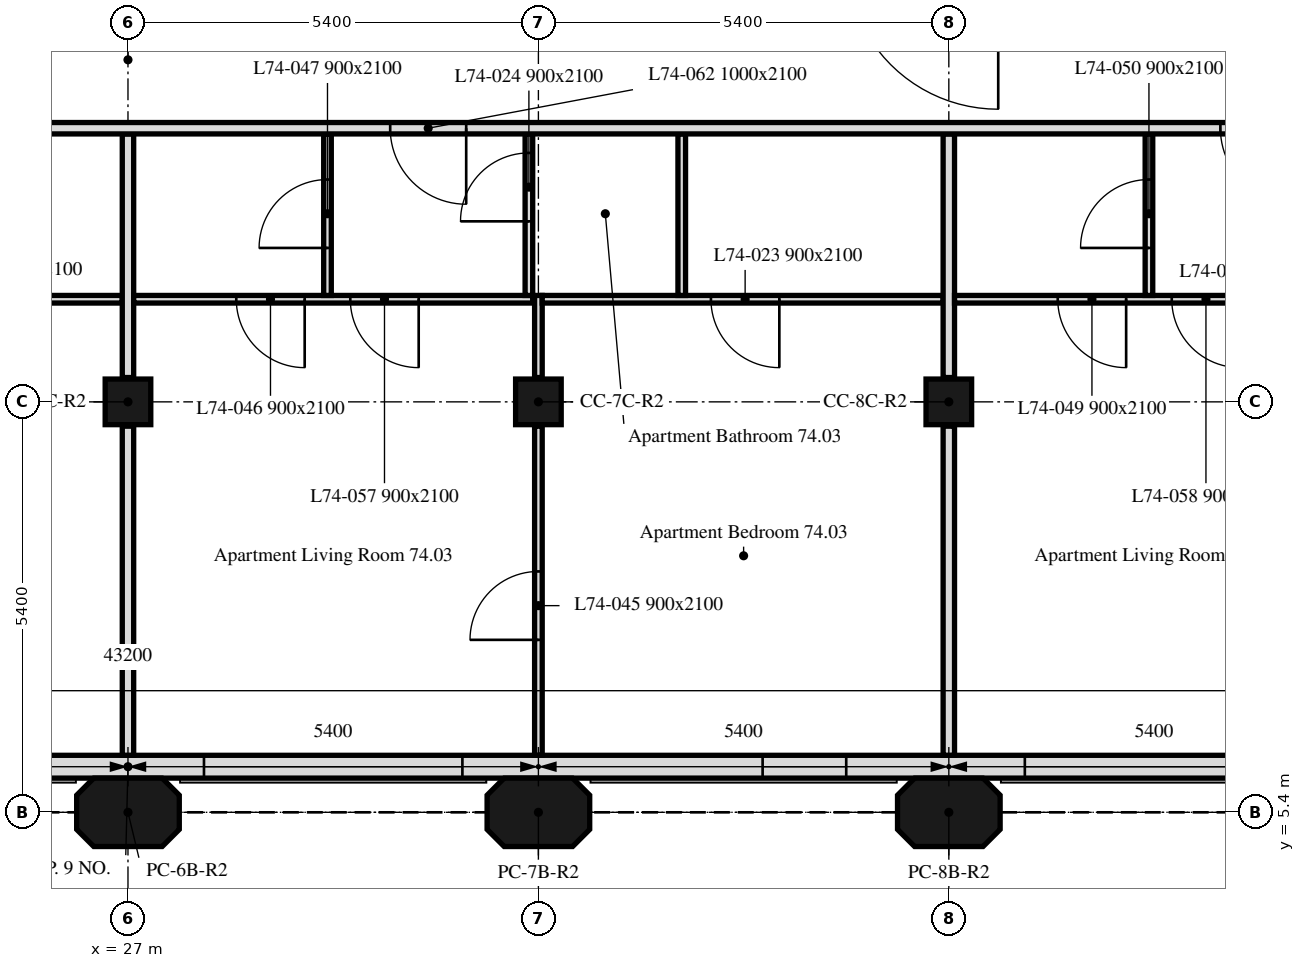
"""IFC4 building model, lengths in metres.
Left out: names, types, materials, properties, quantities, classifications, styles, units other than length and angle.
Written with IfcOpenShell. Run it as: python <this file> out.ifc"""

import sys

from ifc_helpers import new_model, si_unit, direction, frame, frame_2d, origin, origin_2d, place, context, subcontext, project, spatial, polyline, rectangle, outline, extrude, element, fill, save


model = new_model("IFC4")
c1 = context("Model", 3, precision=1e-05, world=origin(), true_north=direction((0.0, 1.0)))
c2 = subcontext(c1, "Body", "Model", "MODEL_VIEW")
j1 = project(units=[si_unit("LENGTHUNIT", "METRE"), si_unit("PLANEANGLEUNIT", "RADIAN")], contexts=[c1])
p1 = place(None, origin())
s1 = spatial("IfcSite", under=j1, at=p1, CompositionType="ELEMENT")
p2 = place(p1, origin())
s2 = spatial("IfcBuilding", under=s1, at=p2, CompositionType="ELEMENT")
p3 = place(p2, frame((0.0, 0.0, 298.3)))
s3 = spatial("IfcBuildingStorey", under=s2, at=p3, CompositionType="ELEMENT", Elevation=298.3)
for number, where, z_axis, x_axis in (
    (1, (27.0, 5.4, 0.0), (0.0, 0.0, 1.0), (1.0, 0.0, 0.0)),
    (2, (32.4, 5.4, 0.0), (0.0, 0.0, 1.0), (1.0, 0.0, 0.0)),
    (3, (37.8, 5.4, 0.0), (0.0, 0.0, 1.0), (1.0, 0.0, 0.0)),
):
    element("IfcColumn", number, at=place(p3, frame(where, z_axis=z_axis, x_axis=x_axis)), inside=s3, PredefinedType="COLUMN", context=c2, shape_type="SweptSolid", body=[
        extrude(outline(polyline([(-0.45, -0.45), (0.45, -0.45), (0.675, -0.225), (0.675, 0.225), (0.45, 0.45), (-0.45, 0.45), (-0.675, 0.225), (-0.675, -0.225), (-0.45, -0.45)])), origin(), (0.0, 0.0, 1.0), 3.0),
    ])
for number, where, z_axis, x_axis in (
    (4, (27.0, 10.8, 0.0), (0.0, 0.0, 1.0), (1.0, 0.0, 0.0)),
    (5, (32.4, 10.8, 0.0), (0.0, 0.0, 1.0), (1.0, 0.0, 0.0)),
    (6, (37.8, 10.8, 0.0), (0.0, 0.0, 1.0), (1.0, 0.0, 0.0)),
):
    element("IfcColumn", number, at=place(p3, frame(where, z_axis=z_axis, x_axis=x_axis)), inside=s3, PredefinedType="COLUMN", context=c2, shape_type="SweptSolid", body=[
        extrude(rectangle(XDim=0.6, YDim=0.6, at=origin_2d()), origin(), (0.0, 0.0, 1.0), 3.0),
    ])
p4 = place(p3, frame((10.986, 6.0, 0.0), z_axis=(0.0, 0.0, 1.0), x_axis=(1.0, 0.0, 0.0)))
e7 = element("IfcWall", 7, at=p4, inside=s3, PredefinedType="SOLIDWALL", context=c2, shape_type="SweptSolid", body=[
    extrude(rectangle(XDim=32.027, YDim=0.3, at=frame_2d((16.014, 0.0))), origin(), (0.0, 0.0, 1.0), 3.0),
])
p5 = place(p4, frame((2.764, 0.0, 0.9)))
e8 = element("IfcOpeningElement", 8, at=p5, cuts=e7, PredefinedType="OPENING", context=c2, shape_type="SweptSolid", body=[
    extrude(rectangle(XDim=1.1, YDim=1.7, at=frame_2d((0.55, 0.85))), frame((0.0, 0.16, 0.0), z_axis=(0.0, -1.0, 0.0), x_axis=(1.0, 0.0, 0.0)), (0.0, 0.0, 1.0), 0.32),
])
p6 = place(p4, frame((6.214, 0.0, 0.9)))
e9 = element("IfcOpeningElement", 9, at=p6, cuts=e7, PredefinedType="OPENING", context=c2, shape_type="SweptSolid", body=[
    extrude(rectangle(XDim=3.4, YDim=1.7, at=frame_2d((1.7, 0.85))), frame((0.0, 0.16, 0.0), z_axis=(0.0, -1.0, 0.0), x_axis=(1.0, 0.0, 0.0)), (0.0, 0.0, 1.0), 0.32),
])
p7 = place(p4, frame((13.564, 0.0, 0.9)))
e10 = element("IfcOpeningElement", 10, at=p7, cuts=e7, PredefinedType="OPENING", context=c2, shape_type="SweptSolid", body=[
    extrude(rectangle(XDim=1.1, YDim=1.7, at=frame_2d((0.55, 0.85))), frame((0.0, 0.16, 0.0), z_axis=(0.0, -1.0, 0.0), x_axis=(1.0, 0.0, 0.0)), (0.0, 0.0, 1.0), 0.32),
])
p8 = place(p4, frame((17.014, 0.0, 0.9)))
e11 = element("IfcOpeningElement", 11, at=p8, cuts=e7, PredefinedType="OPENING", context=c2, shape_type="SweptSolid", body=[
    extrude(rectangle(XDim=3.4, YDim=1.7, at=frame_2d((1.7, 0.85))), frame((0.0, 0.16, 0.0), z_axis=(0.0, -1.0, 0.0), x_axis=(1.0, 0.0, 0.0)), (0.0, 0.0, 1.0), 0.32),
])
p9 = place(p4, frame((24.364, 0.0, 0.9)))
e12 = element("IfcOpeningElement", 12, at=p9, cuts=e7, PredefinedType="OPENING", context=c2, shape_type="SweptSolid", body=[
    extrude(rectangle(XDim=1.1, YDim=1.7, at=frame_2d((0.55, 0.85))), frame((0.0, 0.16, 0.0), z_axis=(0.0, -1.0, 0.0), x_axis=(1.0, 0.0, 0.0)), (0.0, 0.0, 1.0), 0.32),
])
p10 = place(p4, frame((27.814, 0.0, 0.9)))
e13 = element("IfcOpeningElement", 13, at=p10, cuts=e7, PredefinedType="OPENING", context=c2, shape_type="SweptSolid", body=[
    extrude(rectangle(XDim=3.4, YDim=1.7, at=frame_2d((1.7, 0.85))), frame((0.0, 0.16, 0.0), z_axis=(0.0, -1.0, 0.0), x_axis=(1.0, 0.0, 0.0)), (0.0, 0.0, 1.0), 0.32),
])
p11 = place(p3, frame((27.0, 6.151, 0.0), z_axis=(0.0, 0.0, 1.0), x_axis=(0.0, 1.0, 0.0)))
e14 = element("IfcWall", 14, at=p11, inside=s3, PredefinedType="PARTITIONING", context=c2, shape_type="SweptSolid", body=[
    extrude(rectangle(XDim=4.329, YDim=0.15, at=frame_2d((2.165, 0.0))), origin(), (0.0, 0.0, 1.0), 3.0),
])
p12 = place(p3, frame((26.925, 12.15, 0.0), z_axis=(0.0, 0.0, 1.0), x_axis=(-1.0, 0.0, 0.0)))
e15 = element("IfcWall", 15, at=p12, inside=s3, PredefinedType="PARTITIONING", context=c2, shape_type="SweptSolid", body=[
    extrude(rectangle(XDim=5.275, YDim=0.1, at=frame_2d((2.638, 0.0))), origin(), (0.0, 0.0, 1.0), 3.0),
])
p13 = place(p12, frame((1.442, 0.0, 0.0)))
e16 = element("IfcOpeningElement", 16, at=p13, cuts=e15, PredefinedType="OPENING", context=c2, shape_type="SweptSolid", body=[
    extrude(rectangle(XDim=0.9, YDim=2.1, at=frame_2d((0.45, 1.05))), frame((0.0, 0.05, 0.0), z_axis=(0.0, -1.0, 0.0), x_axis=(1.0, 0.0, 0.0)), (0.0, 0.0, 1.0), 0.1),
])
p14 = place(p3, frame((27.0, 11.12, 0.0), z_axis=(0.0, 0.0, 1.0), x_axis=(0.0, 1.0, 0.0)))
e17 = element("IfcWall", 17, at=p14, inside=s3, PredefinedType="PARTITIONING", context=c2, shape_type="SweptSolid", body=[
    extrude(rectangle(XDim=3.205, YDim=0.15, at=frame_2d((1.603, 0.0))), origin(), (0.0, 0.0, 1.0), 3.0),
])
p15 = place(p3, frame((32.4, 6.151, 0.0), z_axis=(0.0, 0.0, 1.0), x_axis=(0.0, 1.0, 0.0)))
e18 = element("IfcWall", 18, at=p15, inside=s3, PredefinedType="PARTITIONING", context=c2, shape_type="SweptSolid", body=[
    extrude(rectangle(XDim=4.329, YDim=0.1, at=frame_2d((2.165, 0.0))), origin(), (0.0, 0.0, 1.0), 3.0),
])
p16 = place(p15, frame((1.518, 0.0, 0.0)))
e19 = element("IfcOpeningElement", 19, at=p16, cuts=e18, PredefinedType="OPENING", context=c2, shape_type="SweptSolid", body=[
    extrude(rectangle(XDim=0.9, YDim=2.1, at=frame_2d((0.45, 1.05))), frame((0.0, 0.05, 0.0), z_axis=(0.0, -1.0, 0.0), x_axis=(1.0, 0.0, 0.0)), (0.0, 0.0, 1.0), 0.1),
])
p17 = place(p3, frame((32.4, 11.12, 0.0), z_axis=(0.0, 0.0, 1.0), x_axis=(0.0, 1.0, 0.0)))
e20 = element("IfcWall", 20, at=p17, inside=s3, PredefinedType="PARTITIONING", context=c2, shape_type="SweptSolid", body=[
    extrude(rectangle(XDim=1.08, YDim=0.1, at=frame_2d((0.54, 0.0))), origin(), (0.0, 0.0, 1.0), 3.0),
])
p18 = place(p3, frame((32.325, 12.15, 0.0), z_axis=(0.0, 0.0, 1.0), x_axis=(-1.0, 0.0, 0.0)))
e21 = element("IfcWall", 21, at=p18, inside=s3, PredefinedType="PARTITIONING", context=c2, shape_type="SweptSolid", body=[
    extrude(rectangle(XDim=5.25, YDim=0.1, at=frame_2d((2.625, 0.0))), origin(), (0.0, 0.0, 1.0), 3.0),
])
p19 = place(p18, frame((3.0, 0.0, 0.0)))
e22 = element("IfcOpeningElement", 22, at=p19, cuts=e21, PredefinedType="OPENING", context=c2, shape_type="SweptSolid", body=[
    extrude(rectangle(XDim=0.9, YDim=2.1, at=frame_2d((0.45, 1.05))), frame((0.0, 0.05, 0.0), z_axis=(0.0, -1.0, 0.0), x_axis=(1.0, 0.0, 0.0)), (0.0, 0.0, 1.0), 0.1),
])
p20 = place(p18, frame((1.5, 0.0, 0.0)))
e23 = element("IfcOpeningElement", 23, at=p20, cuts=e21, PredefinedType="OPENING", context=c2, shape_type="SweptSolid", body=[
    extrude(rectangle(XDim=0.9, YDim=2.1, at=frame_2d((0.45, 1.05))), frame((0.0, 0.05, 0.0), z_axis=(0.0, -1.0, 0.0), x_axis=(1.0, 0.0, 0.0)), (0.0, 0.0, 1.0), 0.1),
])
p21 = place(p3, frame((37.8, 6.151, 0.0), z_axis=(0.0, 0.0, 1.0), x_axis=(0.0, 1.0, 0.0)))
e24 = element("IfcWall", 24, at=p21, inside=s3, PredefinedType="PARTITIONING", context=c2, shape_type="SweptSolid", body=[
    extrude(rectangle(XDim=4.329, YDim=0.15, at=frame_2d((2.165, 0.0))), origin(), (0.0, 0.0, 1.0), 3.0),
])
p22 = place(p3, frame((37.725, 12.15, 0.0), z_axis=(0.0, 0.0, 1.0), x_axis=(-1.0, 0.0, 0.0)))
e25 = element("IfcWall", 25, at=p22, inside=s3, PredefinedType="PARTITIONING", context=c2, shape_type="SweptSolid", body=[
    extrude(rectangle(XDim=5.275, YDim=0.1, at=frame_2d((2.638, 0.0))), origin(), (0.0, 0.0, 1.0), 3.0),
])
p23 = place(p22, frame((2.155, 0.0, 0.0)))
e26 = element("IfcOpeningElement", 26, at=p23, cuts=e25, PredefinedType="OPENING", context=c2, shape_type="SweptSolid", body=[
    extrude(rectangle(XDim=0.9, YDim=2.1, at=frame_2d((0.45, 1.05))), frame((0.0, 0.05, 0.0), z_axis=(0.0, -1.0, 0.0), x_axis=(1.0, 0.0, 0.0)), (0.0, 0.0, 1.0), 0.1),
])
p24 = place(p3, frame((29.625, 12.2, 0.0), z_axis=(0.0, 0.0, 1.0), x_axis=(0.0, 1.0, 0.0)))
e27 = element("IfcWall", 27, at=p24, inside=s3, PredefinedType="PARTITIONING", context=c2, shape_type="SweptSolid", body=[
    extrude(rectangle(XDim=2.125, YDim=0.1, at=frame_2d((1.062, 0.0))), origin(), (0.0, 0.0, 1.0), 3.0),
])
p25 = place(p24, frame((0.625, 0.0, 0.0)))
e28 = element("IfcOpeningElement", 28, at=p25, cuts=e27, PredefinedType="OPENING", context=c2, shape_type="SweptSolid", body=[
    extrude(rectangle(XDim=0.9, YDim=2.1, at=frame_2d((0.45, 1.05))), frame((0.0, 0.05, 0.0), z_axis=(0.0, -1.0, 0.0), x_axis=(1.0, 0.0, 0.0)), (0.0, 0.0, 1.0), 0.1),
])
p26 = place(p3, frame((32.275, 12.2, 0.0), z_axis=(0.0, 0.0, 1.0), x_axis=(0.0, 1.0, 0.0)))
e29 = element("IfcWall", 29, at=p26, inside=s3, PredefinedType="PARTITIONING", context=c2, shape_type="SweptSolid", body=[
    extrude(rectangle(XDim=2.125, YDim=0.1, at=frame_2d((1.062, 0.0))), origin(), (0.0, 0.0, 1.0), 3.0),
])
p27 = place(p26, frame((0.975, 0.0, 0.0)))
e30 = element("IfcOpeningElement", 30, at=p27, cuts=e29, PredefinedType="OPENING", context=c2, shape_type="SweptSolid", body=[
    extrude(rectangle(XDim=0.9, YDim=2.1, at=frame_2d((0.45, 1.05))), frame((0.0, 0.05, 0.0), z_axis=(0.0, -1.0, 0.0), x_axis=(1.0, 0.0, 0.0)), (0.0, 0.0, 1.0), 0.1),
])
p28 = place(p3, frame((34.286, 12.2, 0.0), z_axis=(0.0, 0.0, 1.0), x_axis=(0.0, 1.0, 0.0)))
e31 = element("IfcWall", 31, at=p28, inside=s3, PredefinedType="PARTITIONING", context=c2, shape_type="SweptSolid", body=[
    extrude(rectangle(XDim=2.125, YDim=0.1, at=frame_2d((1.062, 0.0))), origin(), (0.0, 0.0, 1.0), 3.0),
])
p29 = place(p3, frame((37.8, 11.12, 0.0), z_axis=(0.0, 0.0, 1.0), x_axis=(0.0, 1.0, 0.0)))
e32 = element("IfcWall", 32, at=p29, inside=s3, PredefinedType="PARTITIONING", context=c2, shape_type="SweptSolid", body=[
    extrude(rectangle(XDim=3.205, YDim=0.15, at=frame_2d((1.603, 0.0))), origin(), (0.0, 0.0, 1.0), 3.0),
])
p30 = place(p3, frame((43.15, 12.15, 0.0), z_axis=(0.0, 0.0, 1.0), x_axis=(-1.0, 0.0, 0.0)))
e33 = element("IfcWall", 33, at=p30, inside=s3, PredefinedType="PARTITIONING", context=c2, shape_type="SweptSolid", body=[
    extrude(rectangle(XDim=5.275, YDim=0.1, at=frame_2d((2.637, 0.0))), origin(), (0.0, 0.0, 1.0), 3.0),
])
p31 = place(p30, frame((3.017, 0.0, 0.0)))
e34 = element("IfcOpeningElement", 34, at=p31, cuts=e33, PredefinedType="OPENING", context=c2, shape_type="SweptSolid", body=[
    extrude(rectangle(XDim=0.9, YDim=2.1, at=frame_2d((0.45, 1.05))), frame((0.0, 0.05, 0.0), z_axis=(0.0, -1.0, 0.0), x_axis=(1.0, 0.0, 0.0)), (0.0, 0.0, 1.0), 0.1),
])
p32 = place(p30, frame((1.517, 0.0, 0.0)))
e35 = element("IfcOpeningElement", 35, at=p32, cuts=e33, PredefinedType="OPENING", context=c2, shape_type="SweptSolid", body=[
    extrude(rectangle(XDim=0.9, YDim=2.1, at=frame_2d((0.45, 1.05))), frame((0.0, 0.05, 0.0), z_axis=(0.0, -1.0, 0.0), x_axis=(1.0, 0.0, 0.0)), (0.0, 0.0, 1.0), 0.1),
])
p33 = place(p3, frame((40.433, 12.2, 0.0), z_axis=(0.0, 0.0, 1.0), x_axis=(0.0, 1.0, 0.0)))
e36 = element("IfcWall", 36, at=p33, inside=s3, PredefinedType="PARTITIONING", context=c2, shape_type="SweptSolid", body=[
    extrude(rectangle(XDim=2.125, YDim=0.1, at=frame_2d((1.062, 0.0))), origin(), (0.0, 0.0, 1.0), 3.0),
])
p34 = place(p33, frame((0.625, 0.0, 0.0)))
e37 = element("IfcOpeningElement", 37, at=p34, cuts=e36, PredefinedType="OPENING", context=c2, shape_type="SweptSolid", body=[
    extrude(rectangle(XDim=0.9, YDim=2.1, at=frame_2d((0.45, 1.05))), frame((0.0, 0.05, 0.0), z_axis=(0.0, -1.0, 0.0), x_axis=(1.0, 0.0, 0.0)), (0.0, 0.0, 1.0), 0.1),
])
p35 = place(p3, frame((47.849, 14.4, 0.0), z_axis=(0.0, 0.0, 1.0), x_axis=(-1.0, 0.0, 0.0)))
e38 = element("IfcWall", 38, at=p35, inside=s3, PredefinedType="PARTITIONING", context=c2, shape_type="SweptSolid", body=[
    extrude(rectangle(XDim=41.698, YDim=0.15, at=frame_2d((20.849, 0.0))), origin(), (0.0, 0.0, 1.0), 3.0),
])
p36 = place(p35, frame((38.179, 0.0, 0.0)))
e39 = element("IfcOpeningElement", 39, at=p36, cuts=e38, PredefinedType="OPENING", context=c2, shape_type="SweptSolid", body=[
    extrude(rectangle(XDim=1.0, YDim=2.1, at=frame_2d((0.5, 1.05))), frame((0.0, 0.075, 0.0), z_axis=(0.0, -1.0, 0.0), x_axis=(1.0, 0.0, 0.0)), (0.0, 0.0, 1.0), 0.15),
])
p37 = place(p35, frame((27.977, 0.0, 0.0)))
e40 = element("IfcOpeningElement", 40, at=p37, cuts=e38, PredefinedType="OPENING", context=c2, shape_type="SweptSolid", body=[
    extrude(rectangle(XDim=1.0, YDim=2.1, at=frame_2d((0.5, 1.05))), frame((0.0, 0.075, 0.0), z_axis=(0.0, -1.0, 0.0), x_axis=(1.0, 0.0, 0.0)), (0.0, 0.0, 1.0), 0.15),
])
p38 = place(p35, frame((16.399, 0.0, 0.0)))
e41 = element("IfcOpeningElement", 41, at=p38, cuts=e38, PredefinedType="OPENING", context=c2, shape_type="SweptSolid", body=[
    extrude(rectangle(XDim=1.0, YDim=2.1, at=frame_2d((0.5, 1.05))), frame((0.0, 0.075, 0.0), z_axis=(0.0, -1.0, 0.0), x_axis=(1.0, 0.0, 0.0)), (0.0, 0.0, 1.0), 0.15),
])
p39 = place(p35, frame((5.476, 0.0, 0.0)))
e42 = element("IfcOpeningElement", 42, at=p39, cuts=e38, PredefinedType="OPENING", context=c2, shape_type="SweptSolid", body=[
    extrude(rectangle(XDim=1.0, YDim=2.1, at=frame_2d((0.5, 1.05))), frame((0.0, 0.075, 0.0), z_axis=(0.0, -1.0, 0.0), x_axis=(1.0, 0.0, 0.0)), (0.0, 0.0, 1.0), 0.15),
])
p40 = place(p8, origin())
e43 = element("IfcWindow", 43, at=p40, inside=s3, PartitioningType="SINGLE_PANEL", PredefinedType="WINDOW", context=c2, shape_type="SweptSolid", body=[
    extrude(rectangle(XDim=3.4, YDim=1.7, at=frame_2d((1.7, 0.85))), frame((0.0, 0.03, 0.0), z_axis=(0.0, -1.0, 0.0), x_axis=(1.0, 0.0, 0.0)), (0.0, 0.0, 1.0), 0.06),
])
fill(e11, e43)
p41 = place(p9, origin())
e44 = element("IfcWindow", 44, at=p41, inside=s3, PartitioningType="SINGLE_PANEL", PredefinedType="WINDOW", context=c2, shape_type="SweptSolid", body=[
    extrude(rectangle(XDim=1.1, YDim=1.7, at=frame_2d((0.55, 0.85))), frame((0.0, 0.03, 0.0), z_axis=(0.0, -1.0, 0.0), x_axis=(1.0, 0.0, 0.0)), (0.0, 0.0, 1.0), 0.06),
])
fill(e12, e44)
p42 = place(p10, origin())
e45 = element("IfcWindow", 45, at=p42, inside=s3, PartitioningType="SINGLE_PANEL", PredefinedType="WINDOW", context=c2, shape_type="SweptSolid", body=[
    extrude(rectangle(XDim=3.4, YDim=1.7, at=frame_2d((1.7, 0.85))), frame((0.0, 0.03, 0.0), z_axis=(0.0, -1.0, 0.0), x_axis=(1.0, 0.0, 0.0)), (0.0, 0.0, 1.0), 0.06),
])
fill(e13, e45)
p43 = place(p23, origin())
e46 = element("IfcDoor", 46, at=p43, inside=s3, OperationType="SINGLE_SWING_LEFT", PredefinedType="DOOR", context=c2, shape_type="SweptSolid", body=[
    extrude(rectangle(XDim=0.9, YDim=2.1, at=frame_2d((0.45, 1.05))), frame((0.0, 0.025, 0.0), z_axis=(0.0, -1.0, 0.0), x_axis=(1.0, 0.0, 0.0)), (0.0, 0.0, 1.0), 0.05),
])
fill(e26, e46)
p44 = place(p27, origin())
e47 = element("IfcDoor", 47, at=p44, inside=s3, OperationType="SINGLE_SWING_RIGHT", PredefinedType="DOOR", context=c2, shape_type="SweptSolid", body=[
    extrude(rectangle(XDim=0.9, YDim=2.1, at=frame_2d((0.45, 1.05))), frame((0.0, 0.025, 0.0), z_axis=(0.0, -1.0, 0.0), x_axis=(1.0, 0.0, 0.0)), (0.0, 0.0, 1.0), 0.05),
])
fill(e30, e47)
p45 = place(p16, origin())
e48 = element("IfcDoor", 48, at=p45, inside=s3, OperationType="SINGLE_SWING_LEFT", PredefinedType="DOOR", context=c2, shape_type="SweptSolid", body=[
    extrude(rectangle(XDim=0.9, YDim=2.1, at=frame_2d((0.45, 1.05))), frame((0.0, 0.025, 0.0), z_axis=(0.0, -1.0, 0.0), x_axis=(1.0, 0.0, 0.0)), (0.0, 0.0, 1.0), 0.05),
])
fill(e19, e48)
p46 = place(p19, origin())
e49 = element("IfcDoor", 49, at=p46, inside=s3, OperationType="SINGLE_SWING_RIGHT", PredefinedType="DOOR", context=c2, shape_type="SweptSolid", body=[
    extrude(rectangle(XDim=0.9, YDim=2.1, at=frame_2d((0.45, 1.05))), frame((0.0, 0.025, 0.0), z_axis=(0.0, -1.0, 0.0), x_axis=(1.0, 0.0, 0.0)), (0.0, 0.0, 1.0), 0.05),
])
fill(e22, e49)
p47 = place(p25, origin())
e50 = element("IfcDoor", 50, at=p47, inside=s3, OperationType="SINGLE_SWING_RIGHT", PredefinedType="DOOR", context=c2, shape_type="SweptSolid", body=[
    extrude(rectangle(XDim=0.9, YDim=2.1, at=frame_2d((0.45, 1.05))), frame((0.0, 0.025, 0.0), z_axis=(0.0, -1.0, 0.0), x_axis=(1.0, 0.0, 0.0)), (0.0, 0.0, 1.0), 0.05),
])
fill(e28, e50)
p48 = place(p31, origin())
e51 = element("IfcDoor", 51, at=p48, inside=s3, OperationType="SINGLE_SWING_LEFT", PredefinedType="DOOR", context=c2, shape_type="SweptSolid", body=[
    extrude(rectangle(XDim=0.9, YDim=2.1, at=frame_2d((0.45, 1.05))), frame((0.0, 0.025, 0.0), z_axis=(0.0, -1.0, 0.0), x_axis=(1.0, 0.0, 0.0)), (0.0, 0.0, 1.0), 0.05),
])
fill(e34, e51)
p49 = place(p34, origin())
e52 = element("IfcDoor", 52, at=p49, inside=s3, OperationType="SINGLE_SWING_LEFT", PredefinedType="DOOR", context=c2, shape_type="SweptSolid", body=[
    extrude(rectangle(XDim=0.9, YDim=2.1, at=frame_2d((0.45, 1.05))), frame((0.0, 0.025, 0.0), z_axis=(0.0, -1.0, 0.0), x_axis=(1.0, 0.0, 0.0)), (0.0, 0.0, 1.0), 0.05),
])
fill(e37, e52)
p50 = place(p20, origin())
e53 = element("IfcDoor", 53, at=p50, inside=s3, OperationType="SINGLE_SWING_LEFT", PredefinedType="DOOR", context=c2, shape_type="SweptSolid", body=[
    extrude(rectangle(XDim=0.9, YDim=2.1, at=frame_2d((0.45, 1.05))), frame((0.0, 0.025, 0.0), z_axis=(0.0, -1.0, 0.0), x_axis=(1.0, 0.0, 0.0)), (0.0, 0.0, 1.0), 0.05),
])
fill(e23, e53)
p51 = place(p32, origin())
e54 = element("IfcDoor", 54, at=p51, inside=s3, OperationType="SINGLE_SWING_RIGHT", PredefinedType="DOOR", context=c2, shape_type="SweptSolid", body=[
    extrude(rectangle(XDim=0.9, YDim=2.1, at=frame_2d((0.45, 1.05))), frame((0.0, 0.025, 0.0), z_axis=(0.0, -1.0, 0.0), x_axis=(1.0, 0.0, 0.0)), (0.0, 0.0, 1.0), 0.05),
])
fill(e35, e54)
p52 = place(p38, origin())
e55 = element("IfcDoor", 55, at=p52, inside=s3, OperationType="SINGLE_SWING_LEFT", PredefinedType="DOOR", context=c2, shape_type="SweptSolid", body=[
    extrude(rectangle(XDim=1.0, YDim=2.1, at=frame_2d((0.5, 1.05))), frame((0.0, 0.025, 0.0), z_axis=(0.0, -1.0, 0.0), x_axis=(1.0, 0.0, 0.0)), (0.0, 0.0, 1.0), 0.05),
])
fill(e41, e55)
p53 = place(p39, origin())
e56 = element("IfcDoor", 56, at=p53, inside=s3, OperationType="SINGLE_SWING_LEFT", PredefinedType="DOOR", context=c2, shape_type="SweptSolid", body=[
    extrude(rectangle(XDim=1.0, YDim=2.1, at=frame_2d((0.5, 1.05))), frame((0.0, 0.025, 0.0), z_axis=(0.0, -1.0, 0.0), x_axis=(1.0, 0.0, 0.0)), (0.0, 0.0, 1.0), 0.05),
])
fill(e42, e56)
save(model, sys.argv[1])
